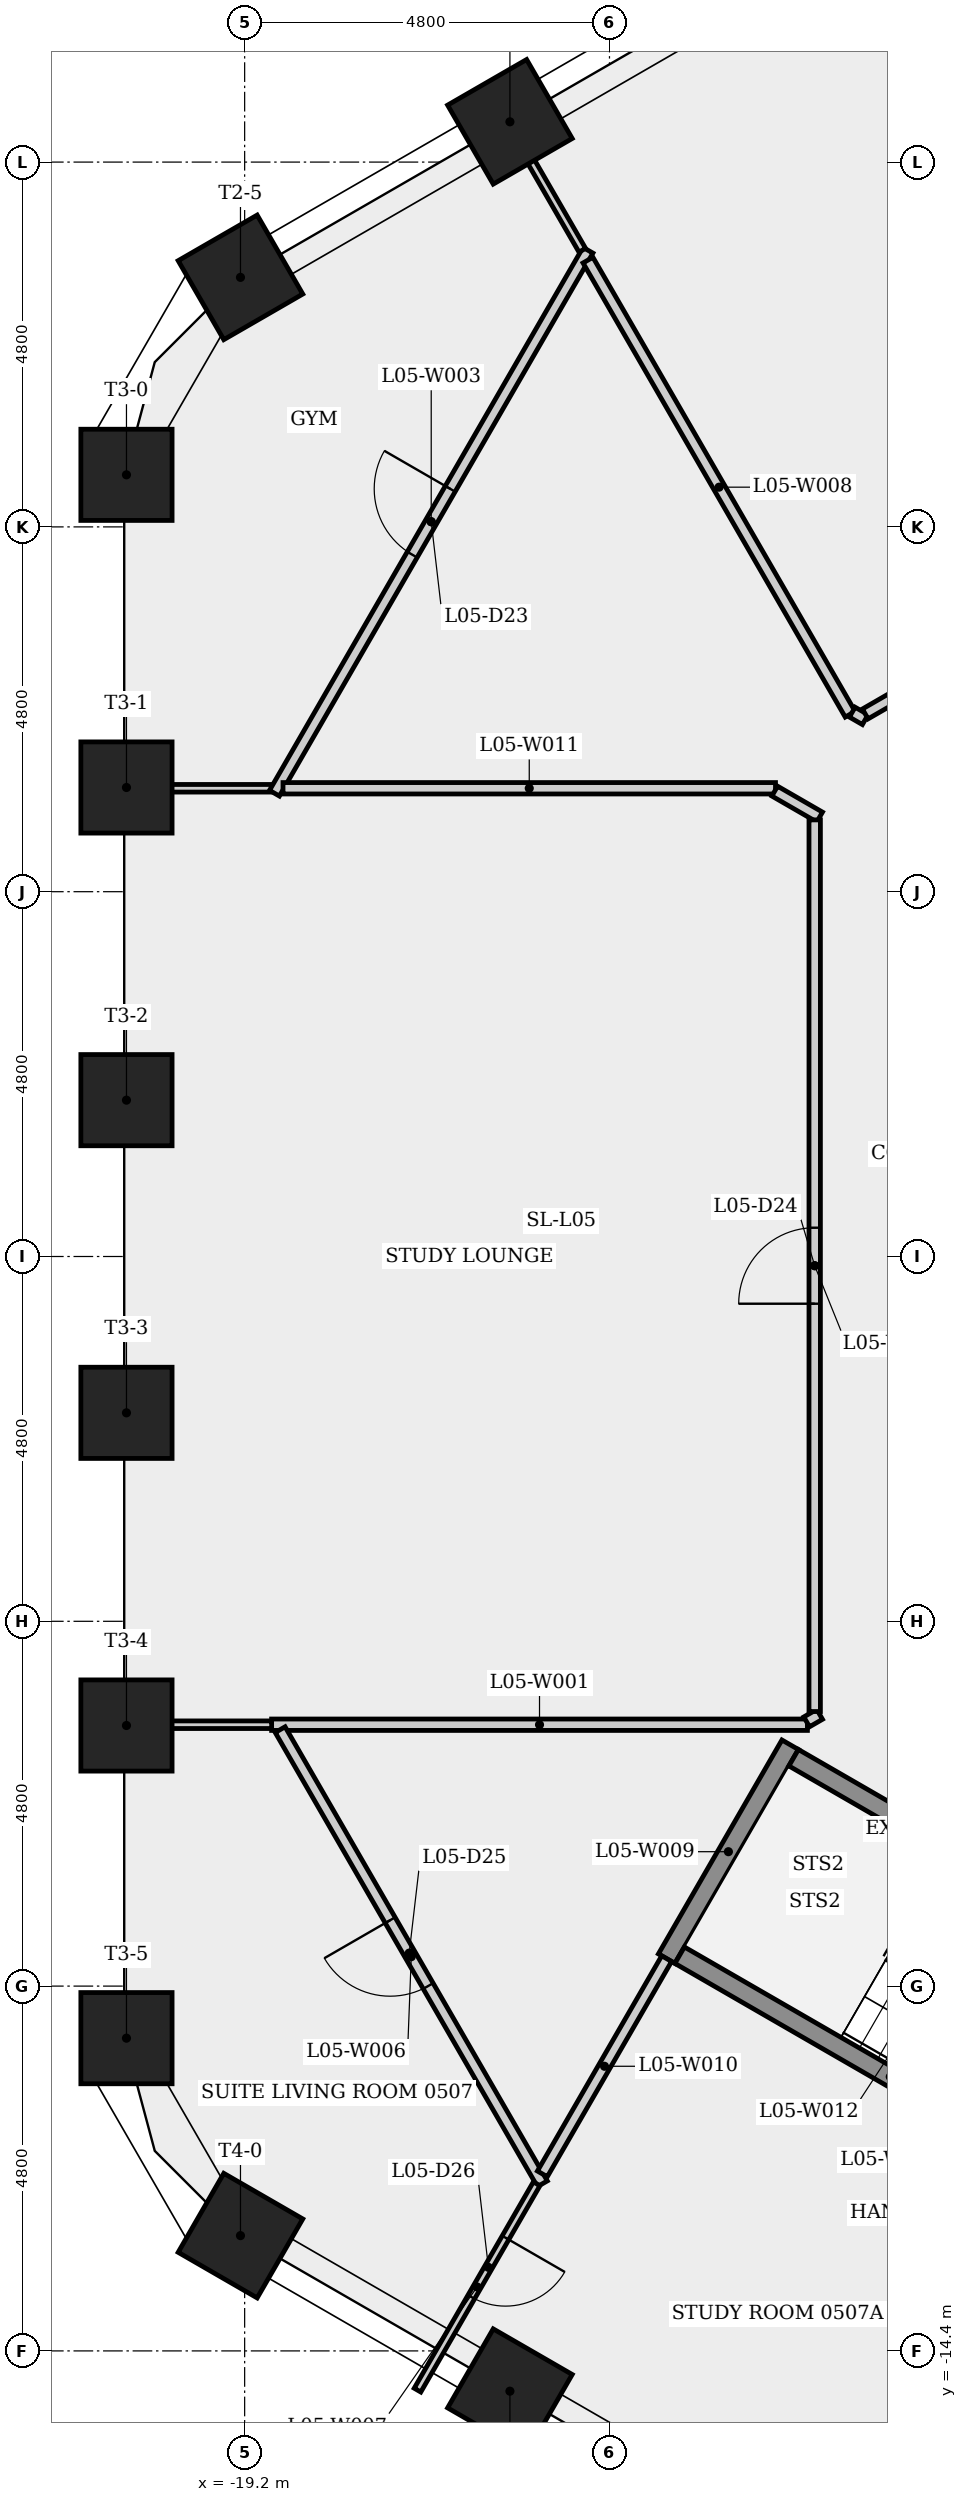
"""IFC4 building model, lengths in metres.
Left out: names, types, materials, properties, quantities, classifications, styles, units other than length and angle.
Written with IfcOpenShell. Run it as: python <this file> out.ifc"""

import sys

from ifc_helpers import new_model, si_unit, direction, frame, frame_2d, origin, origin_2d, place, context, subcontext, project, spatial, rectangle, extrude, element, fill, save


model = new_model("IFC4")
c1 = context("Model", 3, precision=1e-05, world=origin(), true_north=direction((0.0, 1.0)))
c2 = subcontext(c1, "Body", "Model", "MODEL_VIEW")
j1 = project(units=[si_unit("LENGTHUNIT", "METRE"), si_unit("PLANEANGLEUNIT", "RADIAN")], contexts=[c1])
p1 = place(None, origin())
s1 = spatial("IfcSite", under=j1, at=p1, CompositionType="ELEMENT")
p2 = place(p1, origin())
s2 = spatial("IfcBuilding", under=s1, at=p2, CompositionType="ELEMENT")
p3 = place(p2, frame((0.0, 0.0, 25.5)))
s3 = spatial("IfcBuildingStorey", under=s2, at=p3, CompositionType="ELEMENT", Elevation=25.5)
for number, where, z_axis, x_axis in (
    (1, (-15.71, 14.93, 0.0), (0.0, 0.0, 1.0), (-0.5, 0.866, 0.0)),
    (2, (-19.255, 12.883, 0.0), (0.0, 0.0, 1.0), (-0.5, 0.866, 0.0)),
    (3, (-20.755, 10.285, 0.0), (0.0, 0.0, 1.0), (-1.0, 0.0, 0.0)),
    (4, (-20.755, 6.171, 0.0), (0.0, 0.0, 1.0), (-1.0, 0.0, 0.0)),
    (5, (-20.755, 2.057, 0.0), (0.0, 0.0, 1.0), (-1.0, 0.0, 0.0)),
    (6, (-20.755, -2.057, 0.0), (0.0, 0.0, 1.0), (-1.0, 0.0, 0.0)),
    (7, (-20.755, -6.171, 0.0), (0.0, 0.0, 1.0), (-1.0, 0.0, 0.0)),
    (8, (-20.755, -10.285, 0.0), (0.0, 0.0, 1.0), (-1.0, 0.0, 0.0)),
    (9, (-19.255, -12.883, 0.0), (0.0, 0.0, 1.0), (-0.5, -0.866, 0.0)),
    (10, (-15.71, -14.93, 0.0), (0.0, 0.0, 1.0), (-0.5, -0.866, 0.0)),
):
    element("IfcColumn", number, at=place(p3, frame(where, z_axis=z_axis, x_axis=x_axis)), inside=s3, PredefinedType="COLUMN", context=c2, shape_type="SweptSolid", body=[
        extrude(rectangle(XDim=1.2, YDim=1.2, at=origin_2d()), origin(), (0.0, 0.0, 1.0), 3.4),
    ])
p4 = place(p3, frame((-18.845, -6.161, 0.0), z_axis=(0.0, 0.0, 1.0), x_axis=(1.0, 0.0, 0.0)))
e11 = element("IfcWall", 11, at=p4, inside=s3, PredefinedType="PARTITIONING", context=c2, shape_type="SweptSolid", body=[
    extrude(rectangle(XDim=7.049, YDim=0.15, at=frame_2d((3.525, 0.0))), origin(), (0.0, 0.0, 1.0), 3.05),
])
p5 = place(p3, frame((-18.845, 6.161, 0.0), z_axis=(0.0, 0.0, 1.0), x_axis=(-1.0, 0.0, 0.0)))
e12 = element("IfcWall", 12, at=p5, inside=s3, PredefinedType="PARTITIONING", context=c2, shape_type="SweptSolid", body=[
    extrude(rectangle(XDim=1.939, YDim=0.1, at=frame_2d((0.97, 0.0))), origin(), (0.0, 0.0, 1.0), 3.05),
])
p6 = place(p3, frame((-18.808, 6.096, 0.0), z_axis=(0.0, 0.0, 1.0), x_axis=(0.499999979418, 0.866025415668, 0.0)))
e13 = element("IfcWall", 13, at=p6, inside=s3, PredefinedType="PARTITIONING", context=c2, shape_type="SweptSolid", body=[
    extrude(rectangle(XDim=8.25, YDim=0.15, at=frame_2d((4.125, 0.0))), origin(), (0.0, 0.0, 1.0), 3.05),
])
p7 = place(p6, frame((3.625, 0.0, 0.0)))
e14 = element("IfcOpeningElement", 14, at=p7, cuts=e13, PredefinedType="OPENING", context=c2, shape_type="SweptSolid", body=[
    extrude(rectangle(XDim=1.0, YDim=2.1, at=frame_2d((0.5, 1.05))), frame((0.0, 0.085, 0.0), z_axis=(0.0, -1.0, 0.0), x_axis=(1.0, 0.0, 0.0)), (0.0, 0.0, 1.0), 0.17),
])
for number, where, z_axis, x_axis in (
    (15, (-18.845, -6.161, 0.0), (0.0, 0.0, 1.0), (-1.0, 0.0, 0.0)),
    (16, (-15.728, 14.92, 0.0), (0.0, 0.0, 1.0), (0.5, -0.866, 0.0)),
):
    element("IfcWall", number, at=place(p3, frame(where, z_axis=z_axis, x_axis=x_axis)), inside=s3, PredefinedType="PARTITIONING", context=c2, shape_type="SweptSolid", body=[
        extrude(rectangle(XDim=1.939, YDim=0.1, at=frame_2d((0.97, 0.0))), origin(), (0.0, 0.0, 1.0), 3.05),
    ])
p8 = place(p3, frame((-15.283, -12.201, 0.0), z_axis=(0.0, 0.0, 1.0), x_axis=(-0.500009345598, 0.866020008033, 0.0)))
e17 = element("IfcWall", 17, at=p8, inside=s3, PredefinedType="PARTITIONING", context=c2, shape_type="SweptSolid", body=[
    extrude(rectangle(XDim=6.9, YDim=0.15, at=frame_2d((3.45, 0.0))), origin(), (0.0, 0.0, 1.0), 3.05),
])
p9 = place(p8, frame((3.005, 0.0, 0.0)))
e18 = element("IfcOpeningElement", 18, at=p9, cuts=e17, PredefinedType="OPENING", context=c2, shape_type="SweptSolid", body=[
    extrude(rectangle(XDim=1.0, YDim=2.1, at=frame_2d((0.5, 1.05))), frame((0.0, 0.085, 0.0), z_axis=(0.0, -1.0, 0.0), x_axis=(1.0, 0.0, 0.0)), (0.0, 0.0, 1.0), 0.17),
])
p10 = place(p3, frame((-15.358, -12.201, 0.0), z_axis=(0.0, 0.0, 1.0), x_axis=(-0.500041479787, -0.866001454094, 0.0)))
e19 = element("IfcWall", 19, at=p10, inside=s3, PredefinedType="PARTITIONING", context=c2, shape_type="SweptSolid", body=[
    extrude(rectangle(XDim=3.135, YDim=0.1, at=frame_2d((1.568, 0.0))), origin(), (0.0, 0.0, 1.0), 3.05),
])
p11 = place(p10, frame((0.82, 0.0, 0.0)))
e20 = element("IfcOpeningElement", 20, at=p11, cuts=e19, PredefinedType="OPENING", context=c2, shape_type="SweptSolid", body=[
    extrude(rectangle(XDim=0.9, YDim=2.1, at=frame_2d((0.45, 1.05))), frame((0.0, 0.06, 0.0), z_axis=(0.0, -1.0, 0.0), x_axis=(1.0, 0.0, 0.0)), (0.0, 0.0, 1.0), 0.12),
])
p12 = place(p3, frame((-14.683, 13.11, 0.0), z_axis=(0.0, 0.0, 1.0), x_axis=(0.499998129301, -0.86602648383, 0.0)))
e21 = element("IfcWall", 21, at=p12, inside=s3, PredefinedType="PARTITIONING", context=c2, shape_type="SweptSolid", body=[
    extrude(rectangle(XDim=6.899, YDim=0.15, at=frame_2d((3.45, 0.0))), origin(), (0.0, 0.0, 1.0), 3.05),
])
p13 = place(p3, frame((-13.648, -9.239, 0.0), z_axis=(0.0, 0.0, 1.0), x_axis=(0.500017246033, 0.866015446554, 0.0)))
e22 = element("IfcWall", 22, at=p13, inside=s3, PredefinedType="SHEAR", context=c2, shape_type="SweptSolid", body=[
    extrude(rectangle(XDim=3.25, YDim=0.25, at=frame_2d((1.625, 0.0))), origin(), (0.0, 0.0, 1.0), 3.05),
])
p14 = place(p3, frame((-13.648, -9.239, 0.0), z_axis=(0.0, 0.0, 1.0), x_axis=(-0.50004125829, -0.866001581989, 0.0)))
e23 = element("IfcWall", 23, at=p14, inside=s3, PredefinedType="PARTITIONING", context=c2, shape_type="SweptSolid", body=[
    extrude(rectangle(XDim=3.27, YDim=0.15, at=frame_2d((1.635, 0.0))), origin(), (0.0, 0.0, 1.0), 3.05),
])
p15 = place(p3, frame((-12.216, 6.161, 0.0), z_axis=(0.0, 0.0, 1.0), x_axis=(-1.0, 0.0, 0.0)))
e24 = element("IfcWall", 24, at=p15, inside=s3, PredefinedType="PARTITIONING", context=c2, shape_type="SweptSolid", body=[
    extrude(rectangle(XDim=6.479, YDim=0.15, at=frame_2d((3.24, 0.0))), origin(), (0.0, 0.0, 1.0), 3.05),
])
p16 = place(p3, frame((-11.977, -6.595, 0.0), z_axis=(0.0, 0.0, 1.0), x_axis=(0.866025499775, -0.499999833739, 0.0)))
e25 = element("IfcWall", 25, at=p16, inside=s3, PredefinedType="SHEAR", context=c2, shape_type="SweptSolid", body=[
    extrude(rectangle(XDim=6.4, YDim=0.25, at=frame_2d((3.2, 0.0))), origin(), (0.0, 0.0, 1.0), 3.05),
])
p17 = place(p16, frame((5.025, 0.0, 0.0)))
e26 = element("IfcOpeningElement", 26, at=p17, cuts=e25, PredefinedType="OPENING", context=c2, shape_type="SweptSolid", body=[
    extrude(rectangle(XDim=1.0, YDim=2.1, at=frame_2d((0.5, 1.05))), frame((0.0, 0.135, 0.0), z_axis=(0.0, -1.0, 0.0), x_axis=(1.0, 0.0, 0.0)), (0.0, 0.0, 1.0), 0.27),
])
p18 = place(p3, frame((-11.806, -6.123, 0.0), z_axis=(0.0, 0.0, 1.0), x_axis=(0.866103179807, 0.499865263774, 0.0)))
e27 = element("IfcWall", 27, at=p18, inside=s3, PredefinedType="PARTITIONING", context=c2, shape_type="SweptSolid", body=[
    extrude(rectangle(XDim=0.197, YDim=0.15, at=frame_2d((0.099, 0.0))), origin(), (0.0, 0.0, 1.0), 3.05),
])
p19 = place(p3, frame((-11.635, 5.782, 0.0), z_axis=(0.0, 0.0, 1.0), x_axis=(-0.866054481515, 0.499949632511, 0.0)))
e28 = element("IfcWall", 28, at=p19, inside=s3, PredefinedType="PARTITIONING", context=c2, shape_type="SweptSolid", body=[
    extrude(rectangle(XDim=0.682, YDim=0.15, at=frame_2d((0.341, 0.0))), origin(), (0.0, 0.0, 1.0), 3.05),
])
p20 = place(p3, frame((-11.7, -5.987, 0.0), z_axis=(0.0, 0.0, 1.0), x_axis=(0.0, 1.0, 0.0)))
e29 = element("IfcWall", 29, at=p20, inside=s3, PredefinedType="PARTITIONING", context=c2, shape_type="SweptSolid", body=[
    extrude(rectangle(XDim=11.732, YDim=0.15, at=frame_2d((5.866, 0.0))), origin(), (0.0, 0.0, 1.0), 3.05),
])
p21 = place(p20, frame((5.366, 0.0, 0.0)))
e30 = element("IfcOpeningElement", 30, at=p21, cuts=e29, PredefinedType="OPENING", context=c2, shape_type="SweptSolid", body=[
    extrude(rectangle(XDim=1.0, YDim=2.1, at=frame_2d((0.5, 1.05))), frame((0.0, 0.085, 0.0), z_axis=(0.0, -1.0, 0.0), x_axis=(1.0, 0.0, 0.0)), (0.0, 0.0, 1.0), 0.17),
])
p22 = place(p3, frame((-11.206, 7.163, 0.0), z_axis=(0.0, 0.0, 1.0), x_axis=(0.866103179807, -0.499865263774, 0.0)))
e31 = element("IfcWall", 31, at=p22, inside=s3, PredefinedType="PARTITIONING", context=c2, shape_type="SweptSolid", body=[
    extrude(rectangle(XDim=0.197, YDim=0.15, at=frame_2d((0.099, 0.0))), origin(), (0.0, 0.0, 1.0), 3.05),
])
p23 = place(p3, frame((-11.035, 7.139, 0.0), z_axis=(0.0, 0.0, 1.0), x_axis=(0.866022616891, 0.50000482701, 0.0)))
e32 = element("IfcWall", 32, at=p23, inside=s3, PredefinedType="PARTITIONING", context=c2, shape_type="SweptSolid", body=[
    extrude(rectangle(XDim=12.125, YDim=0.15, at=frame_2d((6.062, 0.0))), origin(), (0.0, 0.0, 1.0), 3.05),
])
p24 = place(p23, frame((5.525, 0.0, 0.0)))
e33 = element("IfcOpeningElement", 33, at=p24, cuts=e32, PredefinedType="OPENING", context=c2, shape_type="SweptSolid", body=[
    extrude(rectangle(XDim=1.0, YDim=2.1, at=frame_2d((0.5, 1.05))), frame((0.0, 0.085, 0.0), z_axis=(0.0, -1.0, 0.0), x_axis=(1.0, 0.0, 0.0)), (0.0, 0.0, 1.0), 0.17),
])
p25 = place(p3, frame((-7.935, -12.393, 0.0), z_axis=(0.0, 0.0, 1.0), x_axis=(-0.866025499775, 0.499999833739, 0.0)))
e34 = element("IfcWall", 34, at=p25, inside=s3, PredefinedType="SHEAR", context=c2, shape_type="SweptSolid", body=[
    extrude(rectangle(XDim=6.4, YDim=0.25, at=frame_2d((3.2, 0.0))), origin(), (0.0, 0.0, 1.0), 3.05),
])
p26 = place(p7, origin())
e35 = element("IfcDoor", 35, at=p26, inside=s3, OperationType="SINGLE_SWING_RIGHT", PredefinedType="DOOR", context=c2, shape_type="SweptSolid", body=[
    extrude(rectangle(XDim=1.0, YDim=2.1, at=frame_2d((0.5, 1.05))), frame((0.0, 0.025, 0.0), z_axis=(0.0, -1.0, 0.0), x_axis=(1.0, 0.0, 0.0)), (0.0, 0.0, 1.0), 0.05),
])
fill(e14, e35)
p27 = place(p21, origin())
e36 = element("IfcDoor", 36, at=p27, inside=s3, OperationType="SINGLE_SWING_LEFT", PredefinedType="DOOR", context=c2, shape_type="SweptSolid", body=[
    extrude(rectangle(XDim=1.0, YDim=2.1, at=frame_2d((0.5, 1.05))), frame((0.0, 0.025, 0.0), z_axis=(0.0, -1.0, 0.0), x_axis=(1.0, 0.0, 0.0)), (0.0, 0.0, 1.0), 0.05),
])
fill(e30, e36)
p28 = place(p9, origin())
e37 = element("IfcDoor", 37, at=p28, inside=s3, OperationType="SINGLE_SWING_RIGHT", PredefinedType="DOOR", context=c2, shape_type="SweptSolid", body=[
    extrude(rectangle(XDim=1.0, YDim=2.1, at=frame_2d((0.5, 1.05))), frame((0.0, 0.025, 0.0), z_axis=(0.0, -1.0, 0.0), x_axis=(1.0, 0.0, 0.0)), (0.0, 0.0, 1.0), 0.05),
])
fill(e18, e37)
p29 = place(p11, origin())
e38 = element("IfcDoor", 38, at=p29, inside=s3, OperationType="SINGLE_SWING_LEFT", PredefinedType="DOOR", context=c2, shape_type="SweptSolid", body=[
    extrude(rectangle(XDim=0.9, YDim=2.1, at=frame_2d((0.45, 1.05))), frame((0.0, 0.025, 0.0), z_axis=(0.0, -1.0, 0.0), x_axis=(1.0, 0.0, 0.0)), (0.0, 0.0, 1.0), 0.05),
])
fill(e20, e38)
save(model, sys.argv[1])
